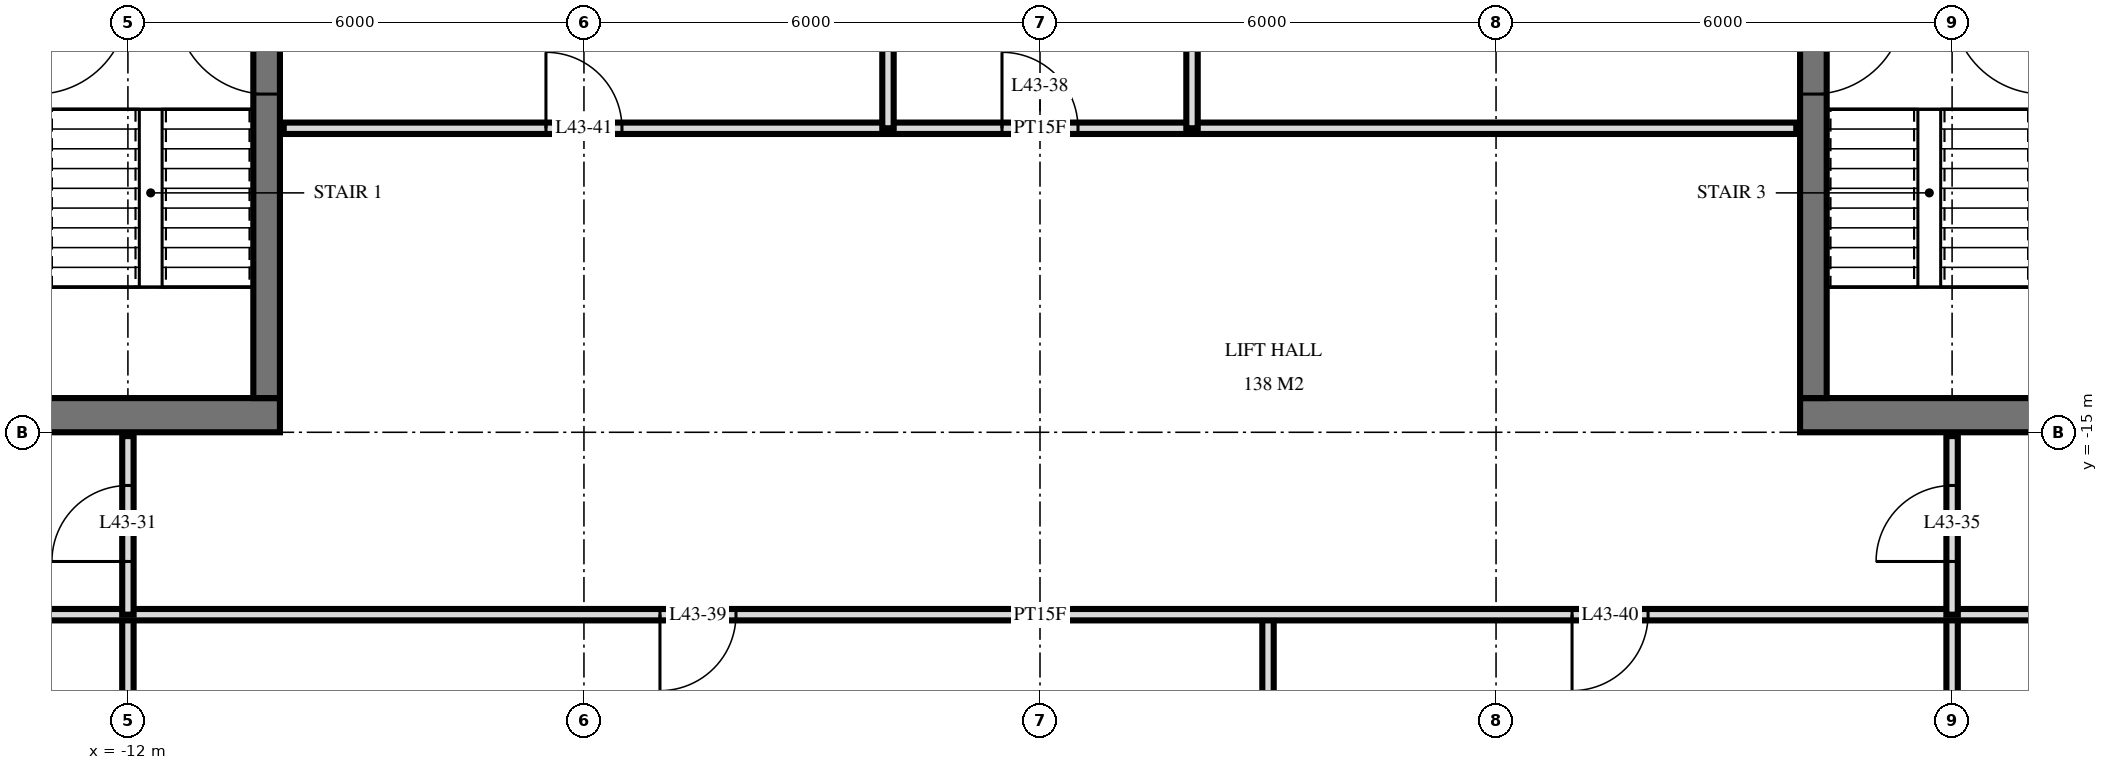
"""IFC4 building model, lengths in metres.
Left out: names, types, materials, properties, quantities, classifications, styles, units other than length and angle.
Written with IfcOpenShell. Run it as: python <this file> out.ifc"""

import sys

from ifc_helpers import new_model, si_unit, direction, frame, frame_2d, origin, place, context, subcontext, project, spatial, rectangle, extrude, element, fill, save


model = new_model("IFC4")
c1 = context("Model", 3, precision=1e-05, world=origin(), true_north=direction((0.0, 1.0)))
c2 = subcontext(c1, "Body", "Model", "MODEL_VIEW")
j1 = project(units=[si_unit("LENGTHUNIT", "METRE"), si_unit("PLANEANGLEUNIT", "RADIAN")], contexts=[c1])
p1 = place(None, origin())
s1 = spatial("IfcSite", under=j1, at=p1, CompositionType="ELEMENT")
p2 = place(p1, origin())
s2 = spatial("IfcBuilding", under=s1, at=p2, CompositionType="ELEMENT")
p3 = place(p2, frame((0.0, 0.0, 166.8)))
s3 = spatial("IfcBuildingStorey", under=s2, at=p3, CompositionType="ELEMENT", Elevation=166.8)
p4 = place(p3, frame((-24.5, -14.775, 0.0), z_axis=(0.0, 0.0, 1.0), x_axis=(1.0, 0.0, 0.0)))
e1 = element("IfcWall", 1, at=p4, inside=s3, PredefinedType="SHEAR", context=c2, shape_type="SweptSolid", body=[
    extrude(rectangle(XDim=14.5, YDim=0.45, at=frame_2d((7.25, 0.0))), origin(), (0.0, 0.0, 1.0), 3.6),
])
p5 = place(p4, frame((6.2, 0.0, 0.0)))
e2 = element("IfcOpeningElement", 2, at=p5, cuts=e1, PredefinedType="OPENING", context=c2, shape_type="SweptSolid", body=[
    extrude(rectangle(XDim=1.2, YDim=2.1, at=frame_2d((0.6, 1.05))), frame((0.0, 0.235, 0.0), z_axis=(0.0, -1.0, 0.0), x_axis=(1.0, 0.0, 0.0)), (0.0, 0.0, 1.0), 0.47),
])
p6 = place(p4, frame((9.25, 0.0, 0.0)))
e3 = element("IfcOpeningElement", 3, at=p6, cuts=e1, PredefinedType="OPENING", context=c2, shape_type="SweptSolid", body=[
    extrude(rectangle(XDim=1.1, YDim=2.1, at=frame_2d((0.55, 1.05))), frame((0.0, 0.235, 0.0), z_axis=(0.0, -1.0, 0.0), x_axis=(1.0, 0.0, 0.0)), (0.0, 0.0, 1.0), 0.47),
])
p7 = place(p4, frame((3.5, 0.0, 0.0)))
e4 = element("IfcOpeningElement", 4, at=p7, cuts=e1, PredefinedType="OPENING", context=c2, shape_type="SweptSolid", body=[
    extrude(rectangle(XDim=0.9, YDim=2.1, at=frame_2d((0.45, 1.05))), frame((0.0, 0.235, 0.0), z_axis=(0.0, -1.0, 0.0), x_axis=(1.0, 0.0, 0.0)), (0.0, 0.0, 1.0), 0.47),
])
p8 = place(p4, frame((1.05, 0.0, 0.0)))
e5 = element("IfcOpeningElement", 5, at=p8, cuts=e1, PredefinedType="OPENING", context=c2, shape_type="SweptSolid", body=[
    extrude(rectangle(XDim=1.0, YDim=2.1, at=frame_2d((0.5, 1.05))), frame((0.0, 0.235, 0.0), z_axis=(0.0, -1.0, 0.0), x_axis=(1.0, 0.0, 0.0)), (0.0, 0.0, 1.0), 0.47),
])
p9 = place(p3, frame((-10.175, -14.55, 0.0), z_axis=(0.0, 0.0, 1.0), x_axis=(0.0, 1.0, 0.0)))
e6 = element("IfcWall", 6, at=p9, inside=s3, PredefinedType="SHEAR", context=c2, shape_type="SweptSolid", body=[
    extrude(rectangle(XDim=14.1, YDim=0.35, at=frame_2d((7.05, 0.0))), origin(), (0.0, 0.0, 1.0), 3.6),
])
p10 = place(p9, frame((8.4, 0.0, 0.0)))
e7 = element("IfcOpeningElement", 7, at=p10, cuts=e6, PredefinedType="OPENING", context=c2, shape_type="SweptSolid", body=[
    extrude(rectangle(XDim=1.4, YDim=2.4, at=frame_2d((0.7, 1.2))), frame((0.0, 0.185, 0.0), z_axis=(0.0, -1.0, 0.0), x_axis=(1.0, 0.0, 0.0)), (0.0, 0.0, 1.0), 0.37),
])
p11 = place(p9, frame((10.0, 0.0, 0.0)))
e8 = element("IfcOpeningElement", 8, at=p11, cuts=e6, PredefinedType="OPENING", context=c2, shape_type="SweptSolid", body=[
    extrude(rectangle(XDim=1.4, YDim=2.4, at=frame_2d((0.7, 1.2))), frame((0.0, 0.185, 0.0), z_axis=(0.0, -1.0, 0.0), x_axis=(1.0, 0.0, 0.0)), (0.0, 0.0, 1.0), 0.37),
])
p12 = place(p9, frame((4.0, 0.0, 0.0)))
e9 = element("IfcOpeningElement", 9, at=p12, cuts=e6, PredefinedType="OPENING", context=c2, shape_type="SweptSolid", body=[
    extrude(rectangle(XDim=1.2, YDim=2.1, at=frame_2d((0.6, 1.05))), frame((0.0, 0.185, 0.0), z_axis=(0.0, -1.0, 0.0), x_axis=(1.0, 0.0, 0.0)), (0.0, 0.0, 1.0), 0.37),
])
p13 = place(p3, frame((10.0, -14.775, 0.0), z_axis=(0.0, 0.0, 1.0), x_axis=(1.0, 0.0, 0.0)))
e10 = element("IfcWall", 10, at=p13, inside=s3, PredefinedType="SHEAR", context=c2, shape_type="SweptSolid", body=[
    extrude(rectangle(XDim=14.5, YDim=0.45, at=frame_2d((7.25, 0.0))), origin(), (0.0, 0.0, 1.0), 3.6),
])
p14 = place(p13, frame((7.1, 0.0, 0.0)))
e11 = element("IfcOpeningElement", 11, at=p14, cuts=e10, PredefinedType="OPENING", context=c2, shape_type="SweptSolid", body=[
    extrude(rectangle(XDim=1.2, YDim=2.1, at=frame_2d((0.6, 1.05))), frame((0.0, 0.235, 0.0), z_axis=(0.0, -1.0, 0.0), x_axis=(1.0, 0.0, 0.0)), (0.0, 0.0, 1.0), 0.47),
])
p15 = place(p13, frame((4.15, 0.0, 0.0)))
e12 = element("IfcOpeningElement", 12, at=p15, cuts=e10, PredefinedType="OPENING", context=c2, shape_type="SweptSolid", body=[
    extrude(rectangle(XDim=1.1, YDim=2.1, at=frame_2d((0.55, 1.05))), frame((0.0, 0.235, 0.0), z_axis=(0.0, -1.0, 0.0), x_axis=(1.0, 0.0, 0.0)), (0.0, 0.0, 1.0), 0.47),
])
p16 = place(p13, frame((10.1, 0.0, 0.0)))
e13 = element("IfcOpeningElement", 13, at=p16, cuts=e10, PredefinedType="OPENING", context=c2, shape_type="SweptSolid", body=[
    extrude(rectangle(XDim=0.9, YDim=2.1, at=frame_2d((0.45, 1.05))), frame((0.0, 0.235, 0.0), z_axis=(0.0, -1.0, 0.0), x_axis=(1.0, 0.0, 0.0)), (0.0, 0.0, 1.0), 0.47),
])
p17 = place(p13, frame((12.45, 0.0, 0.0)))
e14 = element("IfcOpeningElement", 14, at=p17, cuts=e10, PredefinedType="OPENING", context=c2, shape_type="SweptSolid", body=[
    extrude(rectangle(XDim=1.0, YDim=2.1, at=frame_2d((0.5, 1.05))), frame((0.0, 0.235, 0.0), z_axis=(0.0, -1.0, 0.0), x_axis=(1.0, 0.0, 0.0)), (0.0, 0.0, 1.0), 0.47),
])
p18 = place(p3, frame((10.175, -14.55, 0.0), z_axis=(0.0, 0.0, 1.0), x_axis=(0.0, 1.0, 0.0)))
e15 = element("IfcWall", 15, at=p18, inside=s3, PredefinedType="SHEAR", context=c2, shape_type="SweptSolid", body=[
    extrude(rectangle(XDim=14.1, YDim=0.35, at=frame_2d((7.05, 0.0))), origin(), (0.0, 0.0, 1.0), 3.6),
])
p19 = place(p18, frame((8.4, 0.0, 0.0)))
e16 = element("IfcOpeningElement", 16, at=p19, cuts=e15, PredefinedType="OPENING", context=c2, shape_type="SweptSolid", body=[
    extrude(rectangle(XDim=1.4, YDim=2.4, at=frame_2d((0.7, 1.2))), frame((0.0, 0.185, 0.0), z_axis=(0.0, -1.0, 0.0), x_axis=(1.0, 0.0, 0.0)), (0.0, 0.0, 1.0), 0.37),
])
p20 = place(p18, frame((10.0, 0.0, 0.0)))
e17 = element("IfcOpeningElement", 17, at=p20, cuts=e15, PredefinedType="OPENING", context=c2, shape_type="SweptSolid", body=[
    extrude(rectangle(XDim=1.4, YDim=2.4, at=frame_2d((0.7, 1.2))), frame((0.0, 0.185, 0.0), z_axis=(0.0, -1.0, 0.0), x_axis=(1.0, 0.0, 0.0)), (0.0, 0.0, 1.0), 0.37),
])
p21 = place(p18, frame((4.0, 0.0, 0.0)))
e18 = element("IfcOpeningElement", 18, at=p21, cuts=e15, PredefinedType="OPENING", context=c2, shape_type="SweptSolid", body=[
    extrude(rectangle(XDim=1.2, YDim=2.1, at=frame_2d((0.6, 1.05))), frame((0.0, 0.185, 0.0), z_axis=(0.0, -1.0, 0.0), x_axis=(1.0, 0.0, 0.0)), (0.0, 0.0, 1.0), 0.37),
])
p22 = place(p3, frame((12.0, -17.4, 0.0), z_axis=(0.0, 0.0, 1.0), x_axis=(0.0, 1.0, 0.0)))
e19 = element("IfcWall", 19, at=p22, inside=s3, PredefinedType="PARTITIONING", context=c2, shape_type="SweptSolid", body=[
    extrude(rectangle(XDim=2.35, YDim=0.15, at=frame_2d((1.175, 0.0))), origin(), (0.0, 0.0, 1.0), 3.32),
])
p23 = place(p22, frame((0.7, 0.0, 0.0)))
e20 = element("IfcOpeningElement", 20, at=p23, cuts=e19, PredefinedType="OPENING", context=c2, shape_type="SweptSolid", body=[
    extrude(rectangle(XDim=1.0, YDim=2.1, at=frame_2d((0.5, 1.05))), frame((0.0, 0.085, 0.0), z_axis=(0.0, -1.0, 0.0), x_axis=(1.0, 0.0, 0.0)), (0.0, 0.0, 1.0), 0.17),
])
for number, where, z_axis, x_axis in (
    (21, (12.0, -33.62, 0.0), (0.0, 0.0, 1.0), (0.0, 1.0, 0.0)),
    (22, (3.0, -33.62, 0.0), (0.0, 0.0, 1.0), (0.0, 1.0, 0.0)),
):
    element("IfcWall", number, at=place(p3, frame(where, z_axis=z_axis, x_axis=x_axis)), inside=s3, PredefinedType="PARTITIONING", context=c2, shape_type="SweptSolid", body=[
        extrude(rectangle(XDim=16.22, YDim=0.15, at=frame_2d((8.11, 0.0))), origin(), (0.0, 0.0, 1.0), 3.32),
    ])
for number, where, z_axis, x_axis in (
    (23, (2.0, -11.0, 0.0), (0.0, 0.0, 1.0), (0.0, 1.0, 0.0)),
    (24, (-2.0, -11.0, 0.0), (0.0, 0.0, 1.0), (0.0, 1.0, 0.0)),
):
    element("IfcWall", number, at=place(p3, frame(where, z_axis=z_axis, x_axis=x_axis)), inside=s3, PredefinedType="PARTITIONING", context=c2, shape_type="SweptSolid", body=[
        extrude(rectangle(XDim=4.0, YDim=0.15, at=frame_2d((2.0, 0.0))), origin(), (0.0, 0.0, 1.0), 3.32),
    ])
p24 = place(p3, frame((-12.0, -17.4, 0.0), z_axis=(0.0, 0.0, 1.0), x_axis=(0.0, 1.0, 0.0)))
e25 = element("IfcWall", 25, at=p24, inside=s3, PredefinedType="PARTITIONING", context=c2, shape_type="SweptSolid", body=[
    extrude(rectangle(XDim=2.35, YDim=0.15, at=frame_2d((1.175, 0.0))), origin(), (0.0, 0.0, 1.0), 3.32),
])
p25 = place(p24, frame((0.7, 0.0, 0.0)))
e26 = element("IfcOpeningElement", 26, at=p25, cuts=e25, PredefinedType="OPENING", context=c2, shape_type="SweptSolid", body=[
    extrude(rectangle(XDim=1.0, YDim=2.1, at=frame_2d((0.5, 1.05))), frame((0.0, 0.085, 0.0), z_axis=(0.0, -1.0, 0.0), x_axis=(1.0, 0.0, 0.0)), (0.0, 0.0, 1.0), 0.17),
])
p26 = place(p3, frame((-12.0, -33.62, 0.0), z_axis=(0.0, 0.0, 1.0), x_axis=(0.0, 1.0, 0.0)))
e27 = element("IfcWall", 27, at=p26, inside=s3, PredefinedType="PARTITIONING", context=c2, shape_type="SweptSolid", body=[
    extrude(rectangle(XDim=16.22, YDim=0.15, at=frame_2d((8.11, 0.0))), origin(), (0.0, 0.0, 1.0), 3.32),
])
p27 = place(p3, frame((-28.02, -17.4, 0.0), z_axis=(0.0, 0.0, 1.0), x_axis=(1.0, 0.0, 0.0)))
e28 = element("IfcWall", 28, at=p27, inside=s3, PredefinedType="PARTITIONING", context=c2, shape_type="SweptSolid", body=[
    extrude(rectangle(XDim=56.04, YDim=0.15, at=frame_2d((28.02, 0.0))), origin(), (0.0, 0.0, 1.0), 3.32),
])
p28 = place(p27, frame((10.42, 0.0, 0.0)))
e29 = element("IfcOpeningElement", 29, at=p28, cuts=e28, PredefinedType="OPENING", context=c2, shape_type="SweptSolid", body=[
    extrude(rectangle(XDim=1.0, YDim=2.1, at=frame_2d((0.5, 1.05))), frame((0.0, 0.085, 0.0), z_axis=(0.0, -1.0, 0.0), x_axis=(1.0, 0.0, 0.0)), (0.0, 0.0, 1.0), 0.17),
])
p29 = place(p27, frame((2.32, 0.0, 0.0)))
e30 = element("IfcOpeningElement", 30, at=p29, cuts=e28, PredefinedType="OPENING", context=c2, shape_type="SweptSolid", body=[
    extrude(rectangle(XDim=1.0, YDim=2.1, at=frame_2d((0.5, 1.05))), frame((0.0, 0.085, 0.0), z_axis=(0.0, -1.0, 0.0), x_axis=(1.0, 0.0, 0.0)), (0.0, 0.0, 1.0), 0.17),
])
p30 = place(p27, frame((49.72, 0.0, 0.0)))
e31 = element("IfcOpeningElement", 31, at=p30, cuts=e28, PredefinedType="OPENING", context=c2, shape_type="SweptSolid", body=[
    extrude(rectangle(XDim=1.0, YDim=2.1, at=frame_2d((0.5, 1.05))), frame((0.0, 0.085, 0.0), z_axis=(0.0, -1.0, 0.0), x_axis=(1.0, 0.0, 0.0)), (0.0, 0.0, 1.0), 0.17),
])
p31 = place(p27, frame((23.02, 0.0, 0.0)))
e32 = element("IfcOpeningElement", 32, at=p31, cuts=e28, PredefinedType="OPENING", context=c2, shape_type="SweptSolid", body=[
    extrude(rectangle(XDim=1.0, YDim=2.1, at=frame_2d((0.5, 1.05))), frame((0.0, 0.085, 0.0), z_axis=(0.0, -1.0, 0.0), x_axis=(1.0, 0.0, 0.0)), (0.0, 0.0, 1.0), 0.17),
])
p32 = place(p27, frame((35.02, 0.0, 0.0)))
e33 = element("IfcOpeningElement", 33, at=p32, cuts=e28, PredefinedType="OPENING", context=c2, shape_type="SweptSolid", body=[
    extrude(rectangle(XDim=1.0, YDim=2.1, at=frame_2d((0.5, 1.05))), frame((0.0, 0.085, 0.0), z_axis=(0.0, -1.0, 0.0), x_axis=(1.0, 0.0, 0.0)), (0.0, 0.0, 1.0), 0.17),
])
p33 = place(p3, frame((-9.95, -11.0, 0.0), z_axis=(0.0, 0.0, 1.0), x_axis=(1.0, 0.0, 0.0)))
e34 = element("IfcWall", 34, at=p33, inside=s3, PredefinedType="PARTITIONING", context=c2, shape_type="SweptSolid", body=[
    extrude(rectangle(XDim=19.9, YDim=0.15, at=frame_2d((9.95, 0.0))), origin(), (0.0, 0.0, 1.0), 3.32),
])
p34 = place(p33, frame((9.45, 0.0, 0.0)))
e35 = element("IfcOpeningElement", 35, at=p34, cuts=e34, PredefinedType="OPENING", context=c2, shape_type="SweptSolid", body=[
    extrude(rectangle(XDim=1.0, YDim=2.1, at=frame_2d((0.5, 1.05))), frame((0.0, 0.085, 0.0), z_axis=(0.0, -1.0, 0.0), x_axis=(1.0, 0.0, 0.0)), (0.0, 0.0, 1.0), 0.17),
])
p35 = place(p33, frame((3.45, 0.0, 0.0)))
e36 = element("IfcOpeningElement", 36, at=p35, cuts=e34, PredefinedType="OPENING", context=c2, shape_type="SweptSolid", body=[
    extrude(rectangle(XDim=1.0, YDim=2.1, at=frame_2d((0.5, 1.05))), frame((0.0, 0.085, 0.0), z_axis=(0.0, -1.0, 0.0), x_axis=(1.0, 0.0, 0.0)), (0.0, 0.0, 1.0), 0.17),
])
p36 = place(p12, origin())
e37 = element("IfcDoor", 37, at=p36, inside=s3, OperationType="SINGLE_SWING_LEFT", PredefinedType="DOOR", context=c2, shape_type="SweptSolid", body=[
    extrude(rectangle(XDim=1.2, YDim=2.1, at=frame_2d((0.6, 1.05))), frame((0.0, 0.025, 0.0), z_axis=(0.0, -1.0, 0.0), x_axis=(1.0, 0.0, 0.0)), (0.0, 0.0, 1.0), 0.05),
])
fill(e9, e37)
p37 = place(p21, frame((0.6, 0.0, 0.0), z_axis=(0.0, 0.0, 1.0), x_axis=(-1.0, 0.0, 0.0)))
e38 = element("IfcDoor", 38, at=p37, inside=s3, OperationType="SINGLE_SWING_RIGHT", PredefinedType="DOOR", context=c2, shape_type="SweptSolid", body=[
    extrude(rectangle(XDim=1.2, YDim=2.1, at=frame_2d((0.0, 1.05))), frame((0.0, -0.025, 0.0), z_axis=(0.0, 1.0, 0.0), x_axis=(-1.0, 0.0, 0.0)), (0.0, 0.0, 1.0), 0.05),
])
fill(e18, e38)
p38 = place(p25, origin())
e39 = element("IfcDoor", 39, at=p38, inside=s3, OperationType="SINGLE_SWING_RIGHT", PredefinedType="DOOR", context=c2, shape_type="SweptSolid", body=[
    extrude(rectangle(XDim=1.0, YDim=2.1, at=frame_2d((0.5, 1.05))), frame((0.0, 0.025, 0.0), z_axis=(0.0, -1.0, 0.0), x_axis=(1.0, 0.0, 0.0)), (0.0, 0.0, 1.0), 0.05),
])
fill(e26, e39)
p39 = place(p23, origin())
e40 = element("IfcDoor", 40, at=p39, inside=s3, OperationType="SINGLE_SWING_RIGHT", PredefinedType="DOOR", context=c2, shape_type="SweptSolid", body=[
    extrude(rectangle(XDim=1.0, YDim=2.1, at=frame_2d((0.5, 1.05))), frame((0.0, 0.025, 0.0), z_axis=(0.0, -1.0, 0.0), x_axis=(1.0, 0.0, 0.0)), (0.0, 0.0, 1.0), 0.05),
])
fill(e20, e40)
p40 = place(p34, origin())
e41 = element("IfcDoor", 41, at=p40, inside=s3, OperationType="SINGLE_SWING_RIGHT", PredefinedType="DOOR", context=c2, shape_type="SweptSolid", body=[
    extrude(rectangle(XDim=1.0, YDim=2.1, at=frame_2d((0.5, 1.05))), frame((0.0, 0.025, 0.0), z_axis=(0.0, -1.0, 0.0), x_axis=(1.0, 0.0, 0.0)), (0.0, 0.0, 1.0), 0.05),
])
fill(e35, e41)
p41 = place(p31, frame((0.5, 0.0, 0.0), z_axis=(0.0, 0.0, 1.0), x_axis=(-1.0, 0.0, 0.0)))
e42 = element("IfcDoor", 42, at=p41, inside=s3, OperationType="SINGLE_SWING_LEFT", PredefinedType="DOOR", context=c2, shape_type="SweptSolid", body=[
    extrude(rectangle(XDim=1.0, YDim=2.1, at=frame_2d((0.0, 1.05))), frame((0.0, -0.025, 0.0), z_axis=(0.0, 1.0, 0.0), x_axis=(-1.0, 0.0, 0.0)), (0.0, 0.0, 1.0), 0.05),
])
fill(e32, e42)
p42 = place(p32, frame((0.5, 0.0, 0.0), z_axis=(0.0, 0.0, 1.0), x_axis=(-1.0, 0.0, 0.0)))
e43 = element("IfcDoor", 43, at=p42, inside=s3, OperationType="SINGLE_SWING_LEFT", PredefinedType="DOOR", context=c2, shape_type="SweptSolid", body=[
    extrude(rectangle(XDim=1.0, YDim=2.1, at=frame_2d((0.0, 1.05))), frame((0.0, -0.025, 0.0), z_axis=(0.0, 1.0, 0.0), x_axis=(-1.0, 0.0, 0.0)), (0.0, 0.0, 1.0), 0.05),
])
fill(e33, e43)
p43 = place(p35, origin())
e44 = element("IfcDoor", 44, at=p43, inside=s3, OperationType="SINGLE_SWING_RIGHT", PredefinedType="DOOR", context=c2, shape_type="SweptSolid", body=[
    extrude(rectangle(XDim=1.0, YDim=2.1, at=frame_2d((0.5, 1.05))), frame((0.0, 0.025, 0.0), z_axis=(0.0, -1.0, 0.0), x_axis=(1.0, 0.0, 0.0)), (0.0, 0.0, 1.0), 0.05),
])
fill(e36, e44)
save(model, sys.argv[1])
